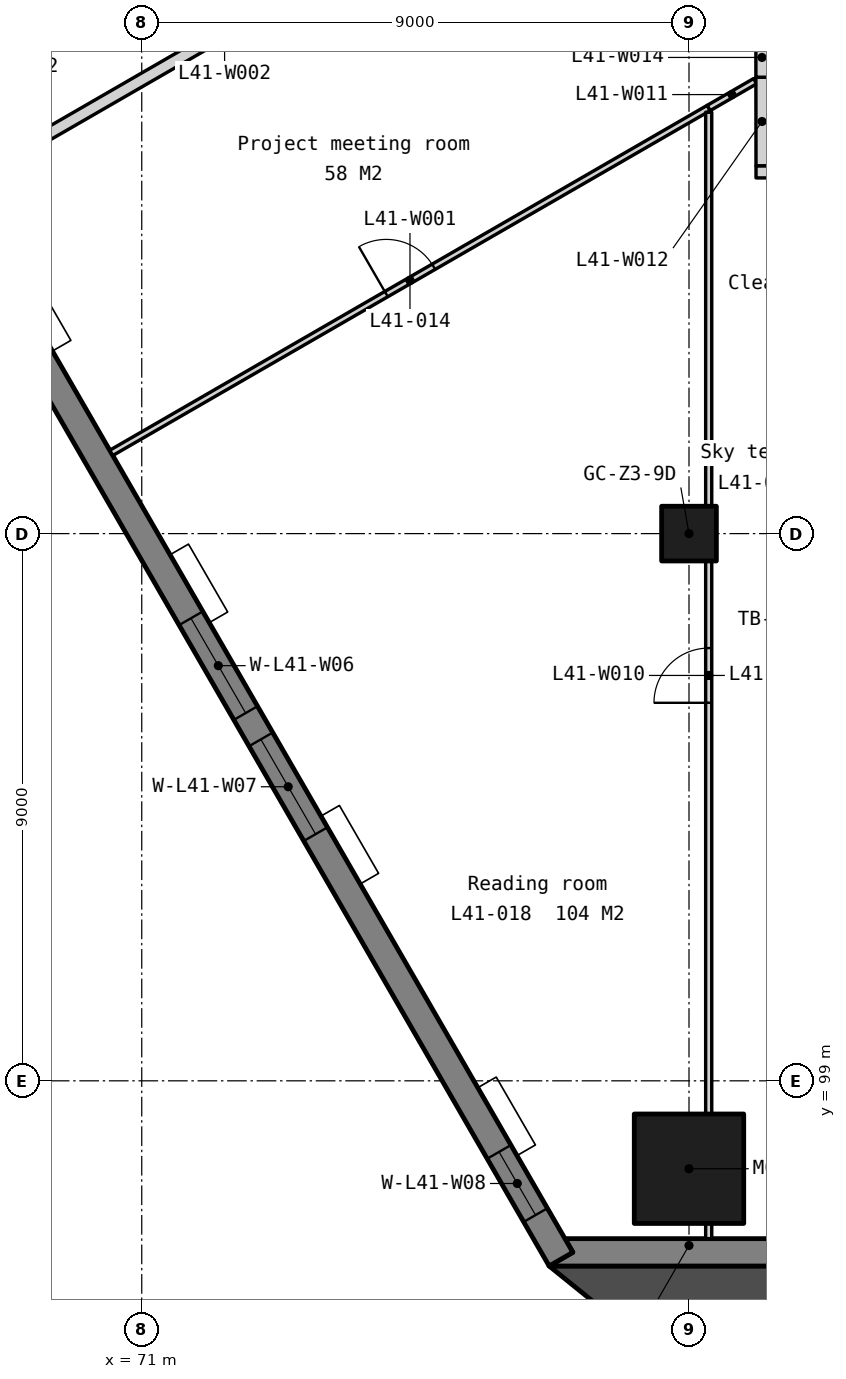
"""IFC4 building model, lengths in metres.
Left out: names, types, materials, properties, quantities, classifications, styles, units other than length and angle.
Written with IfcOpenShell. Run it as: python <this file> out.ifc"""

import sys

from ifc_helpers import new_model, si_unit, direction, frame, frame_2d, origin, origin_2d, place, context, subcontext, project, spatial, polyline, rectangle, outline, extrude, element, fill, save


model = new_model("IFC4")
c1 = context("Model", 3, precision=1e-05, world=origin(), true_north=direction((0.0, 1.0)))
c2 = subcontext(c1, "Body", "Model", "MODEL_VIEW")
j1 = project(units=[si_unit("LENGTHUNIT", "METRE"), si_unit("PLANEANGLEUNIT", "RADIAN")], contexts=[c1])
p1 = place(None, origin())
s1 = spatial("IfcSite", under=j1, at=p1, CompositionType="ELEMENT")
p2 = place(p1, origin())
s2 = spatial("IfcBuilding", under=s1, at=p2, CompositionType="ELEMENT")
p3 = place(p2, frame((0.0, 0.0, 163.7)))
s3 = spatial("IfcBuildingStorey", under=s2, at=p3, CompositionType="ELEMENT", Elevation=163.7)
p4 = place(p3, frame((80.0, 108.0, 0.0), z_axis=(0.0, 0.0, 1.0), x_axis=(1.0, 0.0, 0.0)))
e1 = element("IfcColumn", 1, at=p4, inside=s3, PredefinedType="COLUMN", context=c2, shape_type="SweptSolid", body=[
    extrude(rectangle(XDim=0.9, YDim=0.9, at=origin_2d()), origin(), (0.0, 0.0, 1.0), 3.9),
])
p5 = place(p3, frame((80.0, 97.554, 0.0), z_axis=(0.0, 0.0, 1.0), x_axis=(1.0, 0.0, 0.0)))
e2 = element("IfcColumn", 2, at=p5, inside=s3, PredefinedType="COLUMN", context=c2, shape_type="SweptSolid", body=[
    extrude(rectangle(XDim=1.8, YDim=1.8, at=origin_2d()), origin(), (0.0, 0.0, 1.0), 3.9),
])
p6 = place(p3, frame((0.0, 0.0, -0.15)))
e3 = element("IfcWall", 3, at=p6, inside=s3, PredefinedType="SOLIDWALL", context=c2, shape_type="SweptSolid", body=[
    extrude(outline(polyline([(77.7, 95.954), (78.09, 96.179), (77.96, 96.404), (82.04, 96.404), (81.91, 96.179), (82.3, 95.954), (77.7, 95.954)])), origin(), (0.0, 0.0, 1.0), 3.9),
])
p7 = place(p3, frame((57.652, 131.129, -0.15), z_axis=(0.0, 0.0, 1.0), x_axis=(0.499997369791, -0.866026922331, 0.0)))
e4 = element("IfcWall", 4, at=p7, inside=s3, PredefinedType="SOLIDWALL", context=c2, shape_type="SweptSolid", body=[
    extrude(outline(polyline([(40.486, 0.0), (40.486, 3.9), (0.0, 3.9), (0.0, 0.0), (40.486, 0.0)])), frame((0.0, 0.225, 0.0), z_axis=(0.0, -1.0, 0.0), x_axis=(1.0, 0.0, 0.0)), (0.0, 0.0, 1.0), 0.45),
])
p8 = place(p7, frame((0.837, 0.0, 0.95)))
e5 = element("IfcOpeningElement", 5, at=p8, cuts=e4, PredefinedType="OPENING", context=c2, shape_type="SweptSolid", body=[
    extrude(rectangle(XDim=1.2, YDim=2.2, at=frame_2d((0.6, 1.1))), frame((0.0, 0.235, 0.0), z_axis=(0.0, -1.0, 0.0), x_axis=(1.0, 0.0, 0.0)), (0.0, 0.0, 1.0), 0.47),
])
p9 = place(p7, frame((8.072, 0.0, 0.95)))
e6 = element("IfcOpeningElement", 6, at=p9, cuts=e4, PredefinedType="OPENING", context=c2, shape_type="SweptSolid", body=[
    extrude(rectangle(XDim=1.8, YDim=2.2, at=frame_2d((0.9, 1.1))), frame((0.0, 0.235, 0.0), z_axis=(0.0, -1.0, 0.0), x_axis=(1.0, 0.0, 0.0)), (0.0, 0.0, 1.0), 0.47),
])
p10 = place(p7, frame((10.372, 0.0, 0.95)))
e7 = element("IfcOpeningElement", 7, at=p10, cuts=e4, PredefinedType="OPENING", context=c2, shape_type="SweptSolid", body=[
    extrude(rectangle(XDim=1.8, YDim=2.2, at=frame_2d((0.9, 1.1))), frame((0.0, 0.235, 0.0), z_axis=(0.0, -1.0, 0.0), x_axis=(1.0, 0.0, 0.0)), (0.0, 0.0, 1.0), 0.47),
])
p11 = place(p7, frame((18.193, 0.0, 0.95)))
e8 = element("IfcOpeningElement", 8, at=p11, cuts=e4, PredefinedType="OPENING", context=c2, shape_type="SweptSolid", body=[
    extrude(rectangle(XDim=1.8, YDim=2.2, at=frame_2d((0.9, 1.1))), frame((0.0, 0.235, 0.0), z_axis=(0.0, -1.0, 0.0), x_axis=(1.0, 0.0, 0.0)), (0.0, 0.0, 1.0), 0.47),
])
p12 = place(p7, frame((20.493, 0.0, 0.95)))
e9 = element("IfcOpeningElement", 9, at=p12, cuts=e4, PredefinedType="OPENING", context=c2, shape_type="SweptSolid", body=[
    extrude(rectangle(XDim=1.8, YDim=2.2, at=frame_2d((0.9, 1.1))), frame((0.0, 0.235, 0.0), z_axis=(0.0, -1.0, 0.0), x_axis=(1.0, 0.0, 0.0)), (0.0, 0.0, 1.0), 0.47),
])
p13 = place(p7, frame((28.315, 0.0, 0.95)))
e10 = element("IfcOpeningElement", 10, at=p13, cuts=e4, PredefinedType="OPENING", context=c2, shape_type="SweptSolid", body=[
    extrude(rectangle(XDim=1.8, YDim=2.2, at=frame_2d((0.9, 1.1))), frame((0.0, 0.235, 0.0), z_axis=(0.0, -1.0, 0.0), x_axis=(1.0, 0.0, 0.0)), (0.0, 0.0, 1.0), 0.47),
])
p14 = place(p7, frame((30.615, 0.0, 0.95)))
e11 = element("IfcOpeningElement", 11, at=p14, cuts=e4, PredefinedType="OPENING", context=c2, shape_type="SweptSolid", body=[
    extrude(rectangle(XDim=1.8, YDim=2.2, at=frame_2d((0.9, 1.1))), frame((0.0, 0.235, 0.0), z_axis=(0.0, -1.0, 0.0), x_axis=(1.0, 0.0, 0.0)), (0.0, 0.0, 1.0), 0.47),
])
p15 = place(p7, frame((38.449, 0.0, 0.95)))
e12 = element("IfcOpeningElement", 12, at=p15, cuts=e4, PredefinedType="OPENING", context=c2, shape_type="SweptSolid", body=[
    extrude(rectangle(XDim=1.2, YDim=2.2, at=frame_2d((0.6, 1.1))), frame((0.0, 0.235, 0.0), z_axis=(0.0, -1.0, 0.0), x_axis=(1.0, 0.0, 0.0)), (0.0, 0.0, 1.0), 0.47),
])
p16 = place(p3, frame((0.0, 0.0, -0.15)))
e13 = element("IfcWall", 13, at=p16, inside=s3, PredefinedType="SOLIDWALL", context=c2, shape_type="SweptSolid", body=[
    extrude(outline(polyline([(77.7, 95.954), (80.0, 94.095), (82.3, 95.954), (77.7, 95.954)])), origin(), (0.0, 0.0, 1.0), 3.9),
])
p17 = place(p3, frame((70.499, 109.328, 0.0), z_axis=(0.0, 0.0, 1.0), x_axis=(0.866029704776, 0.49999255039, 0.0)))
e14 = element("IfcWall", 14, at=p17, inside=s3, PredefinedType="PARTITIONING", context=c2, shape_type="SweptSolid", body=[
    extrude(rectangle(XDim=11.345, YDim=0.1, at=frame_2d((5.673, 0.0))), origin(), (0.0, 0.0, 1.0), 3.75),
])
p18 = place(p17, frame((5.223, 0.0, 0.0)))
e15 = element("IfcOpeningElement", 15, at=p18, cuts=e14, PredefinedType="OPENING", context=c2, shape_type="SweptSolid", body=[
    extrude(rectangle(XDim=0.9, YDim=2.1, at=frame_2d((0.45, 1.05))), frame((0.0, 0.06, 0.0), z_axis=(0.0, -1.0, 0.0), x_axis=(1.0, 0.0, 0.0)), (0.0, 0.0, 1.0), 0.12),
])
p19 = place(p3, frame((67.968, 113.71, 0.0), z_axis=(0.0, 0.0, 1.0), x_axis=(0.866024129094, 0.500002207822, 0.0)))
e16 = element("IfcWall", 16, at=p19, inside=s3, PredefinedType="PARTITIONING", context=c2, shape_type="SweptSolid", body=[
    extrude(rectangle(XDim=10.148, YDim=0.2, at=frame_2d((5.074, 0.0))), origin(), (0.0, 0.0, 1.0), 3.75),
])
p20 = place(p3, frame((81.102, 113.95, 0.0), z_axis=(0.0, 0.0, 1.0), x_axis=(1.0, 0.0, 0.0)))
e17 = element("IfcWall", 17, at=p20, inside=s3, PredefinedType="PARTITIONING", context=c2, shape_type="SweptSolid", body=[
    extrude(rectangle(XDim=1.798, YDim=0.2, at=frame_2d((0.899, 0.0))), origin(), (0.0, 0.0, 1.0), 3.75),
])
p21 = place(p3, frame((80.324, 96.404, 0.0), z_axis=(0.0, 0.0, 1.0), x_axis=(0.0, 1.0, 0.0)))
e18 = element("IfcWall", 18, at=p21, inside=s3, PredefinedType="PARTITIONING", context=c2, shape_type="SweptSolid", body=[
    extrude(rectangle(XDim=18.526, YDim=0.1, at=frame_2d((9.263, 0.0))), origin(), (0.0, 0.0, 1.0), 3.75),
])
p22 = place(p21, frame((8.813, 0.0, 0.0)))
e19 = element("IfcOpeningElement", 19, at=p22, cuts=e18, PredefinedType="OPENING", context=c2, shape_type="SweptSolid", body=[
    extrude(rectangle(XDim=0.9, YDim=2.1, at=frame_2d((0.45, 1.05))), frame((0.0, 0.06, 0.0), z_axis=(0.0, -1.0, 0.0), x_axis=(1.0, 0.0, 0.0)), (0.0, 0.0, 1.0), 0.12),
])
p23 = place(p3, frame((80.324, 115.0, 0.0), z_axis=(0.0, 0.0, 1.0), x_axis=(0.866070288904, 0.499922248632, 0.0)))
e20 = element("IfcWall", 20, at=p23, inside=s3, PredefinedType="PARTITIONING", context=c2, shape_type="SweptSolid", body=[
    extrude(rectangle(XDim=0.882, YDim=0.1, at=frame_2d((0.441, 0.0))), origin(), (0.0, 0.0, 1.0), 3.75),
])
p24 = place(p3, frame((81.202, 114.05, 0.0), z_axis=(0.0, 0.0, 1.0), x_axis=(-0.001341605366, 0.999999100047, 0.0)))
e21 = element("IfcWall", 21, at=p24, inside=s3, PredefinedType="PARTITIONING", context=c2, shape_type="SweptSolid", body=[
    extrude(rectangle(XDim=1.456, YDim=0.2, at=frame_2d((0.728, 0.0))), origin(), (0.0, 0.0, 1.0), 3.75),
])
p25 = place(p3, frame((81.2, 115.506, 0.0), z_axis=(0.0, 0.0, 1.0), x_axis=(0.0, 1.0, 0.0)))
e22 = element("IfcWall", 22, at=p25, inside=s3, PredefinedType="PARTITIONING", context=c2, shape_type="SweptSolid", body=[
    extrude(rectangle(XDim=0.651, YDim=0.2, at=frame_2d((0.325, 0.0))), origin(), (0.0, 0.0, 1.0), 3.75),
])
p26 = place(p13, origin())
e23 = element("IfcWindow", 23, at=p26, inside=s3, PartitioningType="SINGLE_PANEL", PredefinedType="WINDOW", context=c2, shape_type="SweptSolid", body=[
    extrude(rectangle(XDim=1.8, YDim=2.2, at=frame_2d((0.9, 1.1))), frame((0.0, 0.03, 0.0), z_axis=(0.0, -1.0, 0.0), x_axis=(1.0, 0.0, 0.0)), (0.0, 0.0, 1.0), 0.06),
])
fill(e10, e23)
p27 = place(p14, origin())
e24 = element("IfcWindow", 24, at=p27, inside=s3, PartitioningType="SINGLE_PANEL", PredefinedType="WINDOW", context=c2, shape_type="SweptSolid", body=[
    extrude(rectangle(XDim=1.8, YDim=2.2, at=frame_2d((0.9, 1.1))), frame((0.0, 0.03, 0.0), z_axis=(0.0, -1.0, 0.0), x_axis=(1.0, 0.0, 0.0)), (0.0, 0.0, 1.0), 0.06),
])
fill(e11, e24)
p28 = place(p15, origin())
e25 = element("IfcWindow", 25, at=p28, inside=s3, PartitioningType="SINGLE_PANEL", PredefinedType="WINDOW", context=c2, shape_type="SweptSolid", body=[
    extrude(rectangle(XDim=1.2, YDim=2.2, at=frame_2d((0.6, 1.1))), frame((0.0, 0.03, 0.0), z_axis=(0.0, -1.0, 0.0), x_axis=(1.0, 0.0, 0.0)), (0.0, 0.0, 1.0), 0.06),
])
fill(e12, e25)
p29 = place(p22, origin())
e26 = element("IfcDoor", 26, at=p29, inside=s3, OperationType="SINGLE_SWING_LEFT", PredefinedType="DOOR", context=c2, shape_type="SweptSolid", body=[
    extrude(rectangle(XDim=0.9, YDim=2.1, at=frame_2d((0.45, 1.05))), frame((0.0, 0.025, 0.0), z_axis=(0.0, -1.0, 0.0), x_axis=(1.0, 0.0, 0.0)), (0.0, 0.0, 1.0), 0.05),
])
fill(e19, e26)
p30 = place(p18, origin())
e27 = element("IfcDoor", 27, at=p30, inside=s3, OperationType="SINGLE_SWING_LEFT", PredefinedType="DOOR", context=c2, shape_type="SweptSolid", body=[
    extrude(rectangle(XDim=0.9, YDim=2.1, at=frame_2d((0.45, 1.05))), frame((0.0, 0.025, 0.0), z_axis=(0.0, -1.0, 0.0), x_axis=(1.0, 0.0, 0.0)), (0.0, 0.0, 1.0), 0.05),
])
fill(e15, e27)
save(model, sys.argv[1])
